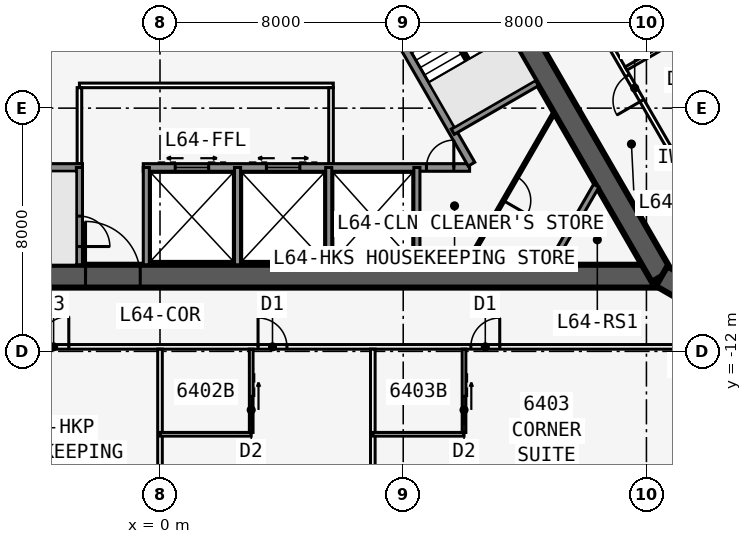
"""IFC4 building model, lengths in metres.
Left out: names, types, materials, properties, quantities, classifications, styles, units other than length and angle.
Written with IfcOpenShell. Run it as: python <this file> out.ifc"""

import sys

from ifc_helpers import new_model, si_unit, direction, frame, frame_2d, origin, place, context, subcontext, project, spatial, rectangle, extrude, element, fill, save


model = new_model("IFC4")
c1 = context("Model", 3, precision=1e-05, world=origin(), true_north=direction((0.0, 1.0)))
c2 = subcontext(c1, "Body", "Model", "MODEL_VIEW")
j1 = project(units=[si_unit("LENGTHUNIT", "METRE"), si_unit("PLANEANGLEUNIT", "RADIAN")], contexts=[c1])
p1 = place(None, origin())
s1 = spatial("IfcSite", under=j1, at=p1, CompositionType="ELEMENT")
p2 = place(p1, origin())
s2 = spatial("IfcBuilding", under=s1, at=p2, CompositionType="ELEMENT")
p3 = place(p2, frame((0.0, 0.0, 242.9)))
s3 = spatial("IfcBuildingStorey", under=s2, at=p3, CompositionType="ELEMENT", Elevation=242.9)
p4 = place(p3, frame((-16.5, -9.526, 0.0), z_axis=(0.0, 0.0, 1.0), x_axis=(1.0, 0.0, 0.0)))
e1 = element("IfcWall", 1, at=p4, inside=s3, PredefinedType="SHEAR", context=c2, shape_type="SweptSolid", body=[
    extrude(rectangle(XDim=33.0, YDim=0.75, at=frame_2d((16.5, 0.0))), origin(), (0.0, 0.0, 1.0), 3.6),
])
p5 = place(p4, frame((14.05, 0.0, 0.0)))
e2 = element("IfcOpeningElement", 2, at=p5, cuts=e1, PredefinedType="OPENING", context=c2, shape_type="SweptSolid", body=[
    extrude(rectangle(XDim=1.8, YDim=2.13, at=frame_2d((0.9, 1.065))), frame((0.0, 0.385, 0.0), z_axis=(0.0, -1.0, 0.0), x_axis=(1.0, 0.0, 0.0)), (0.0, 0.0, 1.0), 0.77),
])
p6 = place(p3, frame((-10.183, -5.951, 0.0), z_axis=(0.0, 0.0, 1.0), x_axis=(1.0, 0.0, 0.0)))
e3 = element("IfcWall", 3, at=p6, inside=s3, PredefinedType="SOLIDWALL", context=c2, shape_type="SweptSolid", body=[
    extrude(rectangle(XDim=7.633, YDim=0.25, at=frame_2d((3.816, 0.0))), origin(), (0.0, 0.0, 1.0), 3.435),
])
p7 = place(p3, frame((-0.55, -5.951, 0.0), z_axis=(0.0, 0.0, 1.0), x_axis=(1.0, 0.0, 0.0)))
e4 = element("IfcWall", 4, at=p7, inside=s3, PredefinedType="SOLIDWALL", context=c2, shape_type="SweptSolid", body=[
    extrude(rectangle(XDim=10.733, YDim=0.25, at=frame_2d((5.366, 0.0))), origin(), (0.0, 0.0, 1.0), 3.435),
])
p8 = place(p7, frame((9.314, 0.0, 0.0)))
e5 = element("IfcOpeningElement", 5, at=p8, cuts=e4, PredefinedType="OPENING", context=c2, shape_type="SweptSolid", body=[
    extrude(rectangle(XDim=0.9, YDim=2.13, at=frame_2d((0.45, 1.065))), frame((0.0, 0.135, 0.0), z_axis=(0.0, -1.0, 0.0), x_axis=(1.0, 0.0, 0.0)), (0.0, 0.0, 1.0), 0.27),
])
p9 = place(p7, frame((1.05, 0.0, 0.0)))
e6 = element("IfcOpeningElement", 6, at=p9, cuts=e4, PredefinedType="OPENING", context=c2, shape_type="SweptSolid", body=[
    extrude(rectangle(XDim=1.1, YDim=2.13, at=frame_2d((0.55, 1.065))), frame((0.0, 0.135, 0.0), z_axis=(0.0, -1.0, 0.0), x_axis=(1.0, 0.0, 0.0)), (0.0, 0.0, 1.0), 0.27),
])
p10 = place(p7, frame((4.05, 0.0, 0.0)))
e7 = element("IfcOpeningElement", 7, at=p10, cuts=e4, PredefinedType="OPENING", context=c2, shape_type="SweptSolid", body=[
    extrude(rectangle(XDim=1.1, YDim=2.13, at=frame_2d((0.55, 1.065))), frame((0.0, 0.135, 0.0), z_axis=(0.0, -1.0, 0.0), x_axis=(1.0, 0.0, 0.0)), (0.0, 0.0, 1.0), 0.27),
])
p11 = place(p3, frame((-2.65, -5.951, 0.0), z_axis=(0.0, 0.0, 1.0), x_axis=(0.0, -1.0, 0.0)))
e8 = element("IfcWall", 8, at=p11, inside=s3, PredefinedType="SOLIDWALL", context=c2, shape_type="SweptSolid", body=[
    extrude(rectangle(XDim=3.2, YDim=0.2, at=frame_2d((1.6, 0.0))), origin(), (0.0, 0.0, 1.0), 3.435),
])
p12 = place(p11, frame((1.6, 0.0, 0.0)))
e9 = element("IfcOpeningElement", 9, at=p12, cuts=e8, PredefinedType="OPENING", context=c2, shape_type="SweptSolid", body=[
    extrude(rectangle(XDim=1.0, YDim=2.13, at=frame_2d((0.5, 1.065))), frame((0.0, 0.11, 0.0), z_axis=(0.0, -1.0, 0.0), x_axis=(1.0, 0.0, 0.0)), (0.0, 0.0, 1.0), 0.22),
])
for number, where, z_axis, x_axis in (
    (10, (-0.45, -5.951, 0.0), (0.0, 0.0, 1.0), (0.0, -1.0, 0.0)),
    (11, (2.55, -5.951, 0.0), (0.0, 0.0, 1.0), (0.0, -1.0, 0.0)),
    (12, (5.55, -5.951, 0.0), (0.0, 0.0, 1.0), (0.0, -1.0, 0.0)),
    (13, (8.45, -5.951, 0.0), (0.0, 0.0, 1.0), (0.0, -1.0, 0.0)),
):
    element("IfcWall", number, at=place(p3, frame(where, z_axis=z_axis, x_axis=x_axis)), inside=s3, PredefinedType="SOLIDWALL", context=c2, shape_type="SweptSolid", body=[
        extrude(rectangle(XDim=3.2, YDim=0.2, at=frame_2d((1.6, 0.0))), origin(), (0.0, 0.0, 1.0), 3.435),
    ])
p13 = place(p3, frame((16.5, -9.526, 0.0), z_axis=(0.0, 0.0, 1.0), x_axis=(-0.499999749417, 0.866025548458, 0.0)))
e14 = element("IfcWall", 14, at=p13, inside=s3, PredefinedType="SHEAR", context=c2, shape_type="SweptSolid", body=[
    extrude(rectangle(XDim=33.0, YDim=0.75, at=frame_2d((16.5, 0.0))), origin(), (0.0, 0.0, 1.0), 3.6),
])
p14 = place(p13, frame((14.15, 0.0, 0.0)))
e15 = element("IfcOpeningElement", 15, at=p14, cuts=e14, PredefinedType="OPENING", context=c2, shape_type="SweptSolid", body=[
    extrude(rectangle(XDim=1.8, YDim=2.13, at=frame_2d((0.9, 1.065))), frame((0.0, 0.385, 0.0), z_axis=(0.0, -1.0, 0.0), x_axis=(1.0, 0.0, 0.0)), (0.0, 0.0, 1.0), 0.77),
])
p15 = place(p13, frame((12.6, 0.0, 0.0)))
e16 = element("IfcOpeningElement", 16, at=p15, cuts=e14, PredefinedType="OPENING", context=c2, shape_type="SweptSolid", body=[
    extrude(rectangle(XDim=1.0, YDim=2.13, at=frame_2d((0.5, 1.065))), frame((0.0, 0.385, 0.0), z_axis=(0.0, -1.0, 0.0), x_axis=(1.0, 0.0, 0.0)), (0.0, 0.0, 1.0), 0.77),
])
p16 = place(p3, frame((10.245, -5.843, 0.0), z_axis=(0.0, 0.0, 1.0), x_axis=(-0.499993009313, 0.866029439822, 0.0)))
e17 = element("IfcWall", 17, at=p16, inside=s3, PredefinedType="SOLIDWALL", context=c2, shape_type="SweptSolid", body=[
    extrude(rectangle(XDim=7.733, YDim=0.25, at=frame_2d((3.866, 0.0))), origin(), (0.0, 0.0, 1.0), 3.435),
])
p17 = place(p3, frame((9.629, -4.775, 0.0), z_axis=(0.0, 0.0, 1.0), x_axis=(0.866008981251, 0.500028443584, 0.0)))
e18 = element("IfcWall", 18, at=p17, inside=s3, PredefinedType="SOLIDWALL", context=c2, shape_type="SweptSolid", body=[
    extrude(rectangle(XDim=3.2, YDim=0.2, at=frame_2d((1.6, 0.0))), origin(), (0.0, 0.0, 1.0), 3.435),
])
p18 = place(p3, frame((0.0, 19.052, 0.0), z_axis=(0.0, 0.0, 1.0), x_axis=(-0.499999749417, -0.866025548458, 0.0)))
e19 = element("IfcWall", 19, at=p18, inside=s3, PredefinedType="SHEAR", context=c2, shape_type="SweptSolid", body=[
    extrude(rectangle(XDim=33.0, YDim=0.75, at=frame_2d((16.5, 0.0))), origin(), (0.0, 0.0, 1.0), 3.6),
])
p19 = place(p18, frame((14.15, 0.0, 0.0)))
e20 = element("IfcOpeningElement", 20, at=p19, cuts=e19, PredefinedType="OPENING", context=c2, shape_type="SweptSolid", body=[
    extrude(rectangle(XDim=1.8, YDim=2.13, at=frame_2d((0.9, 1.065))), frame((0.0, 0.385, 0.0), z_axis=(0.0, -1.0, 0.0), x_axis=(1.0, 0.0, 0.0)), (0.0, 0.0, 1.0), 0.77),
])
p20 = place(p18, frame((12.6, 0.0, 0.0)))
e21 = element("IfcOpeningElement", 21, at=p20, cuts=e19, PredefinedType="OPENING", context=c2, shape_type="SweptSolid", body=[
    extrude(rectangle(XDim=1.0, YDim=2.13, at=frame_2d((0.5, 1.065))), frame((0.0, 0.385, 0.0), z_axis=(0.0, -1.0, 0.0), x_axis=(1.0, 0.0, 0.0)), (0.0, 0.0, 1.0), 0.77),
])
p21 = place(p3, frame((16.5, -9.526, 0.0), z_axis=(0.0, 0.0, 1.0), x_axis=(0.866031398331, -0.499989616998, 0.0)))
e22 = element("IfcWall", 22, at=p21, inside=s3, PredefinedType="SHEAR", context=c2, shape_type="SweptSolid", body=[
    extrude(rectangle(XDim=4.746, YDim=0.75, at=frame_2d((2.373, 0.0))), origin(), (0.0, 0.0, 1.0), 3.6),
])
p22 = place(p21, frame((1.725, 0.0, 0.0)))
e23 = element("IfcOpeningElement", 23, at=p22, cuts=e22, PredefinedType="OPENING", context=c2, shape_type="SweptSolid", body=[
    extrude(rectangle(XDim=1.8, YDim=2.13, at=frame_2d((0.9, 1.065))), frame((0.0, 0.385, 0.0), z_axis=(0.0, -1.0, 0.0), x_axis=(1.0, 0.0, 0.0)), (0.0, 0.0, 1.0), 0.77),
])
p23 = place(p3, frame((13.942, -17.103, 0.0), z_axis=(0.0, 0.0, 1.0), x_axis=(0.965913862671, 0.258863689806, 0.0)))
e24 = element("IfcWall", 24, at=p23, inside=s3, PredefinedType="SOLIDWALL", context=c2, shape_type="SweptSolid", body=[
    extrude(rectangle(XDim=4.782, YDim=0.45, at=frame_2d((2.391, 0.0))), origin(), (0.0, 0.0, 1.0), 3.435),
])
p24 = place(p23, frame((0.591, 0.0, 0.45)))
e25 = element("IfcOpeningElement", 25, at=p24, cuts=e24, PredefinedType="OPENING", context=c2, shape_type="SweptSolid", body=[
    extrude(rectangle(XDim=3.6, YDim=2.6, at=frame_2d((1.8, 1.3))), frame((0.0, 0.235, 0.0), z_axis=(0.0, -1.0, 0.0), x_axis=(1.0, 0.0, 0.0)), (0.0, 0.0, 1.0), 0.47),
])
p25 = place(p3, frame((-19.677, -11.851, 0.0), z_axis=(0.0, 0.0, 1.0), x_axis=(1.0, 0.0, 0.0)))
e26 = element("IfcWall", 26, at=p25, inside=s3, PredefinedType="PARTITIONING", context=c2, shape_type="SweptSolid", body=[
    extrude(rectangle(XDim=39.354, YDim=0.15, at=frame_2d((19.677, 0.0))), origin(), (0.0, 0.0, 1.0), 3.435),
])
p26 = place(p25, frame((8.502, 0.0, 0.0)))
e27 = element("IfcOpeningElement", 27, at=p26, cuts=e26, PredefinedType="OPENING", context=c2, shape_type="SweptSolid", body=[
    extrude(rectangle(XDim=0.95, YDim=2.13, at=frame_2d((0.475, 1.065))), frame((0.0, 0.085, 0.0), z_axis=(0.0, -1.0, 0.0), x_axis=(1.0, 0.0, 0.0)), (0.0, 0.0, 1.0), 0.17),
])
p27 = place(p25, frame((15.677, 0.0, 0.0)))
e28 = element("IfcOpeningElement", 28, at=p27, cuts=e26, PredefinedType="OPENING", context=c2, shape_type="SweptSolid", body=[
    extrude(rectangle(XDim=1.0, YDim=2.13, at=frame_2d((0.5, 1.065))), frame((0.0, 0.085, 0.0), z_axis=(0.0, -1.0, 0.0), x_axis=(1.0, 0.0, 0.0)), (0.0, 0.0, 1.0), 0.17),
])
p28 = place(p25, frame((22.902, 0.0, 0.0)))
e29 = element("IfcOpeningElement", 29, at=p28, cuts=e26, PredefinedType="OPENING", context=c2, shape_type="SweptSolid", body=[
    extrude(rectangle(XDim=0.95, YDim=2.13, at=frame_2d((0.475, 1.065))), frame((0.0, 0.085, 0.0), z_axis=(0.0, -1.0, 0.0), x_axis=(1.0, 0.0, 0.0)), (0.0, 0.0, 1.0), 0.17),
])
p29 = place(p25, frame((29.902, 0.0, 0.0)))
e30 = element("IfcOpeningElement", 30, at=p29, cuts=e26, PredefinedType="OPENING", context=c2, shape_type="SweptSolid", body=[
    extrude(rectangle(XDim=0.95, YDim=2.13, at=frame_2d((0.475, 1.065))), frame((0.0, 0.085, 0.0), z_axis=(0.0, -1.0, 0.0), x_axis=(1.0, 0.0, 0.0)), (0.0, 0.0, 1.0), 0.17),
])
p30 = place(p3, frame((0.0, -11.926, 0.0), z_axis=(0.0, 0.0, 1.0), x_axis=(0.0, -1.0, 0.0)))
e31 = element("IfcWall", 31, at=p30, inside=s3, PredefinedType="PARTITIONING", context=c2, shape_type="SweptSolid", body=[
    extrude(rectangle(XDim=6.854, YDim=0.15, at=frame_2d((3.427, 0.0))), origin(), (0.0, 0.0, 1.0), 2.678),
])
p31 = place(p3, frame((7.0, -11.926, 0.0), z_axis=(0.0, 0.0, 1.0), x_axis=(0.0, -1.0, 0.0)))
e32 = element("IfcWall", 32, at=p31, inside=s3, PredefinedType="PARTITIONING", context=c2, shape_type="SweptSolid", body=[
    extrude(rectangle(XDim=6.609, YDim=0.15, at=frame_2d((3.304, 0.0))), origin(), (0.0, 0.0, 1.0), 2.678),
])
p32 = place(p3, frame((0.0, -14.726, 0.0), z_axis=(0.0, 0.0, 1.0), x_axis=(1.0, 0.0, 0.0)))
e33 = element("IfcWall", 33, at=p32, inside=s3, PredefinedType="PLUMBINGWALL", context=c2, shape_type="SweptSolid", body=[
    extrude(rectangle(XDim=3.0, YDim=0.12, at=frame_2d((1.5, 0.0))), origin(), (0.0, 0.0, 1.0), 3.435),
])
p33 = place(p3, frame((3.0, -11.926, 0.0), z_axis=(0.0, 0.0, 1.0), x_axis=(0.0, -1.0, 0.0)))
e34 = element("IfcWall", 34, at=p33, inside=s3, PredefinedType="PLUMBINGWALL", context=c2, shape_type="SweptSolid", body=[
    extrude(rectangle(XDim=2.74, YDim=0.12, at=frame_2d((1.37, 0.0))), origin(), (0.0, 0.0, 1.0), 3.435),
])
p34 = place(p33, frame((1.55, 0.0, 0.0)))
e35 = element("IfcOpeningElement", 35, at=p34, cuts=e34, PredefinedType="OPENING", context=c2, shape_type="SweptSolid", body=[
    extrude(rectangle(XDim=0.9, YDim=2.13, at=frame_2d((0.45, 1.065))), frame((0.0, 0.07, 0.0), z_axis=(0.0, -1.0, 0.0), x_axis=(1.0, 0.0, 0.0)), (0.0, 0.0, 1.0), 0.14),
])
p35 = place(p3, frame((7.0, -14.726, 0.0), z_axis=(0.0, 0.0, 1.0), x_axis=(1.0, 0.0, 0.0)))
e36 = element("IfcWall", 36, at=p35, inside=s3, PredefinedType="PLUMBINGWALL", context=c2, shape_type="SweptSolid", body=[
    extrude(rectangle(XDim=3.0, YDim=0.12, at=frame_2d((1.5, 0.0))), origin(), (0.0, 0.0, 1.0), 3.435),
])
p36 = place(p3, frame((10.0, -11.926, 0.0), z_axis=(0.0, 0.0, 1.0), x_axis=(0.0, -1.0, 0.0)))
e37 = element("IfcWall", 37, at=p36, inside=s3, PredefinedType="PLUMBINGWALL", context=c2, shape_type="SweptSolid", body=[
    extrude(rectangle(XDim=2.74, YDim=0.12, at=frame_2d((1.37, 0.0))), origin(), (0.0, 0.0, 1.0), 3.435),
])
p37 = place(p36, frame((1.55, 0.0, 0.0)))
e38 = element("IfcOpeningElement", 38, at=p37, cuts=e37, PredefinedType="OPENING", context=c2, shape_type="SweptSolid", body=[
    extrude(rectangle(XDim=0.9, YDim=2.13, at=frame_2d((0.45, 1.065))), frame((0.0, 0.07, 0.0), z_axis=(0.0, -1.0, 0.0), x_axis=(1.0, 0.0, 0.0)), (0.0, 0.0, 1.0), 0.14),
])
p38 = place(p3, frame((20.102, -11.115, 0.0), z_axis=(0.0, 0.0, 1.0), x_axis=(-0.500001960654, 0.866024271797, 0.0)))
e39 = element("IfcWall", 39, at=p38, inside=s3, PredefinedType="PARTITIONING", context=c2, shape_type="SweptSolid", body=[
    extrude(rectangle(XDim=12.677, YDim=0.15, at=frame_2d((6.339, 0.0))), origin(), (0.0, 0.0, 1.0), 3.435),
])
p39 = place(p38, frame((8.502, 0.0, 0.0)))
e40 = element("IfcOpeningElement", 40, at=p39, cuts=e39, PredefinedType="OPENING", context=c2, shape_type="SweptSolid", body=[
    extrude(rectangle(XDim=0.95, YDim=2.13, at=frame_2d((0.475, 1.065))), frame((0.0, 0.085, 0.0), z_axis=(0.0, -1.0, 0.0), x_axis=(1.0, 0.0, 0.0)), (0.0, 0.0, 1.0), 0.17),
])
p40 = place(p3, frame((15.329, -2.697, 0.0), z_axis=(0.0, 0.0, 1.0), x_axis=(0.866035715982, 0.499982138324, 0.0)))
e41 = element("IfcWall", 41, at=p40, inside=s3, PredefinedType="PLUMBINGWALL", context=c2, shape_type="SweptSolid", body=[
    extrude(rectangle(XDim=2.74, YDim=0.12, at=frame_2d((1.37, 0.0))), origin(), (0.0, 0.0, 1.0), 3.435),
])
p41 = place(p40, frame((1.55, 0.0, 0.0)))
e42 = element("IfcOpeningElement", 42, at=p41, cuts=e41, PredefinedType="OPENING", context=c2, shape_type="SweptSolid", body=[
    extrude(rectangle(XDim=0.9, YDim=2.13, at=frame_2d((0.45, 1.065))), frame((0.0, 0.07, 0.0), z_axis=(0.0, -1.0, 0.0), x_axis=(1.0, 0.0, 0.0)), (0.0, 0.0, 1.0), 0.14),
])
p42 = place(p3, frame((-0.425, 22.966, 0.0), z_axis=(0.0, 0.0, 1.0), x_axis=(-0.500000265775, -0.866025250339, 0.0)))
e43 = element("IfcWall", 43, at=p42, inside=s3, PredefinedType="PARTITIONING", context=c2, shape_type="SweptSolid", body=[
    extrude(rectangle(XDim=39.354, YDim=0.15, at=frame_2d((19.677, 0.0))), origin(), (0.0, 0.0, 1.0), 3.435),
])
p43 = place(p42, frame((8.502, 0.0, 0.0)))
e44 = element("IfcOpeningElement", 44, at=p43, cuts=e43, PredefinedType="OPENING", context=c2, shape_type="SweptSolid", body=[
    extrude(rectangle(XDim=0.95, YDim=2.13, at=frame_2d((0.475, 1.065))), frame((0.0, 0.085, 0.0), z_axis=(0.0, -1.0, 0.0), x_axis=(1.0, 0.0, 0.0)), (0.0, 0.0, 1.0), 0.17),
])
p44 = place(p42, frame((15.902, 0.0, 0.0)))
e45 = element("IfcOpeningElement", 45, at=p44, cuts=e43, PredefinedType="OPENING", context=c2, shape_type="SweptSolid", body=[
    extrude(rectangle(XDim=0.95, YDim=2.13, at=frame_2d((0.475, 1.065))), frame((0.0, 0.085, 0.0), z_axis=(0.0, -1.0, 0.0), x_axis=(1.0, 0.0, 0.0)), (0.0, 0.0, 1.0), 0.17),
])
p45 = place(p42, frame((22.902, 0.0, 0.0)))
e46 = element("IfcOpeningElement", 46, at=p45, cuts=e43, PredefinedType="OPENING", context=c2, shape_type="SweptSolid", body=[
    extrude(rectangle(XDim=0.95, YDim=2.13, at=frame_2d((0.475, 1.065))), frame((0.0, 0.085, 0.0), z_axis=(0.0, -1.0, 0.0), x_axis=(1.0, 0.0, 0.0)), (0.0, 0.0, 1.0), 0.17),
])
p46 = place(p42, frame((29.902, 0.0, 0.0)))
e47 = element("IfcOpeningElement", 47, at=p46, cuts=e43, PredefinedType="OPENING", context=c2, shape_type="SweptSolid", body=[
    extrude(rectangle(XDim=0.95, YDim=2.13, at=frame_2d((0.475, 1.065))), frame((0.0, 0.085, 0.0), z_axis=(0.0, -1.0, 0.0), x_axis=(1.0, 0.0, 0.0)), (0.0, 0.0, 1.0), 0.17),
])
p47 = place(p3, frame((-2.65, -3.251, 0.0), z_axis=(0.0, 0.0, 1.0), x_axis=(1.0, 0.0, 0.0)))
e48 = element("IfcWall", 48, at=p47, inside=s3, PredefinedType="PARTITIONING", context=c2, shape_type="SweptSolid", body=[
    extrude(rectangle(XDim=8.35, YDim=0.15, at=frame_2d((4.175, 0.0))), origin(), (0.0, 0.0, 1.0), 3.435),
])
for number, where, z_axis, x_axis in (
    (49, (-2.65, -5.826, 0.0), (0.0, 0.0, 1.0), (0.0, 1.0, 0.0)),
    (50, (5.625, -5.826, 0.0), (0.0, 0.0, 1.0), (0.0, 1.0, 0.0)),
):
    element("IfcWall", number, at=place(p3, frame(where, z_axis=z_axis, x_axis=x_axis)), inside=s3, PredefinedType="PARTITIONING", context=c2, shape_type="SweptSolid", body=[
        extrude(rectangle(XDim=2.5, YDim=0.15, at=frame_2d((1.25, 0.0))), origin(), (0.0, 0.0, 1.0), 3.435),
    ])
p48 = place(p3, frame((14.349, -6.551, 0.0), z_axis=(0.0, 0.0, 1.0), x_axis=(-0.499952404951, -0.866052881055, 0.0)))
e51 = element("IfcWall", 51, at=p48, inside=s3, PredefinedType="SOLIDWALL", context=c2, shape_type="SweptSolid", body=[
    extrude(rectangle(XDim=3.002, YDim=0.2, at=frame_2d((1.501, 0.0))), origin(), (0.0, 0.0, 1.0), 3.435),
])
p49 = place(p3, frame((12.964, -4.151, 0.0), z_axis=(0.0, 0.0, 1.0), x_axis=(-0.500027479704, -0.866009537788, 0.0)))
e52 = element("IfcWall", 52, at=p49, inside=s3, PredefinedType="PARTITIONING", context=c2, shape_type="SweptSolid", body=[
    extrude(rectangle(XDim=5.774, YDim=0.1, at=frame_2d((2.887, 0.0))), origin(), (0.0, 0.0, 1.0), 3.435),
])
p50 = place(p49, frame((2.437, 0.0, 0.0)))
e53 = element("IfcOpeningElement", 53, at=p50, cuts=e52, PredefinedType="OPENING", context=c2, shape_type="SweptSolid", body=[
    extrude(rectangle(XDim=0.9, YDim=2.13, at=frame_2d((0.45, 1.065))), frame((0.0, 0.06, 0.0), z_axis=(0.0, -1.0, 0.0), x_axis=(1.0, 0.0, 0.0)), (0.0, 0.0, 1.0), 0.12),
])
p51 = place(p3, frame((10.135, -2.401, 0.0), z_axis=(0.0, 0.0, 1.0), x_axis=(-0.499992232847, 0.866029888106, 0.0)))
e54 = element("IfcWall", 54, at=p51, inside=s3, PredefinedType="SOLIDWALL", context=c2, shape_type="SweptSolid", body=[
    extrude(rectangle(XDim=2.794, YDim=0.1, at=frame_2d((1.397, 0.0))), origin(), (0.0, 0.0, 1.0), 3.6),
])
p52 = place(p27, origin())
e55 = element("IfcDoor", 55, at=p52, inside=s3, OperationType="SINGLE_SWING_RIGHT", PredefinedType="DOOR", context=c2, shape_type="SweptSolid", body=[
    extrude(rectangle(XDim=1.0, YDim=2.13, at=frame_2d((0.5, 1.065))), frame((0.0, 0.025, 0.0), z_axis=(0.0, -1.0, 0.0), x_axis=(1.0, 0.0, 0.0)), (0.0, 0.0, 1.0), 0.05),
])
fill(e28, e55)
p53 = place(p34, origin())
e56 = element("IfcDoor", 56, at=p53, inside=s3, OperationType="SLIDING_TO_LEFT", PredefinedType="DOOR", context=c2, shape_type="SweptSolid", body=[
    extrude(rectangle(XDim=0.9, YDim=2.13, at=frame_2d((0.45, 1.065))), frame((0.0, 0.025, 0.0), z_axis=(0.0, -1.0, 0.0), x_axis=(1.0, 0.0, 0.0)), (0.0, 0.0, 1.0), 0.05),
])
fill(e35, e56)
p54 = place(p28, origin())
e57 = element("IfcDoor", 57, at=p54, inside=s3, OperationType="SINGLE_SWING_LEFT", PredefinedType="DOOR", context=c2, shape_type="SweptSolid", body=[
    extrude(rectangle(XDim=0.95, YDim=2.13, at=frame_2d((0.475, 1.065))), frame((0.0, 0.025, 0.0), z_axis=(0.0, -1.0, 0.0), x_axis=(1.0, 0.0, 0.0)), (0.0, 0.0, 1.0), 0.05),
])
fill(e29, e57)
p55 = place(p37, origin())
e58 = element("IfcDoor", 58, at=p55, inside=s3, OperationType="SLIDING_TO_LEFT", PredefinedType="DOOR", context=c2, shape_type="SweptSolid", body=[
    extrude(rectangle(XDim=0.9, YDim=2.13, at=frame_2d((0.45, 1.065))), frame((0.0, 0.025, 0.0), z_axis=(0.0, -1.0, 0.0), x_axis=(1.0, 0.0, 0.0)), (0.0, 0.0, 1.0), 0.05),
])
fill(e38, e58)
p56 = place(p29, origin())
e59 = element("IfcDoor", 59, at=p56, inside=s3, OperationType="SINGLE_SWING_RIGHT", PredefinedType="DOOR", context=c2, shape_type="SweptSolid", body=[
    extrude(rectangle(XDim=0.95, YDim=2.13, at=frame_2d((0.475, 1.065))), frame((0.0, 0.025, 0.0), z_axis=(0.0, -1.0, 0.0), x_axis=(1.0, 0.0, 0.0)), (0.0, 0.0, 1.0), 0.05),
])
fill(e30, e59)
p57 = place(p39, origin())
e60 = element("IfcDoor", 60, at=p57, inside=s3, OperationType="SINGLE_SWING_LEFT", PredefinedType="DOOR", context=c2, shape_type="SweptSolid", body=[
    extrude(rectangle(XDim=0.95, YDim=2.13, at=frame_2d((0.475, 1.065))), frame((0.0, 0.025, 0.0), z_axis=(0.0, -1.0, 0.0), x_axis=(1.0, 0.0, 0.0)), (0.0, 0.0, 1.0), 0.05),
])
fill(e40, e60)
p58 = place(p5, origin())
e61 = element("IfcDoor", 61, at=p58, inside=s3, OperationType="DOUBLE_DOOR_SINGLE_SWING", PredefinedType="DOOR", context=c2, shape_type="SweptSolid", body=[
    extrude(rectangle(XDim=1.8, YDim=2.13, at=frame_2d((0.9, 1.065))), frame((0.0, 0.025, 0.0), z_axis=(0.0, -1.0, 0.0), x_axis=(1.0, 0.0, 0.0)), (0.0, 0.0, 1.0), 0.05),
])
fill(e2, e61)
p59 = place(p12, origin())
e62 = element("IfcDoor", 62, at=p59, inside=s3, OperationType="SINGLE_SWING_RIGHT", PredefinedType="DOOR", context=c2, shape_type="SweptSolid", body=[
    extrude(rectangle(XDim=1.0, YDim=2.13, at=frame_2d((0.5, 1.065))), frame((0.0, 0.025, 0.0), z_axis=(0.0, -1.0, 0.0), x_axis=(1.0, 0.0, 0.0)), (0.0, 0.0, 1.0), 0.05),
])
fill(e9, e62)
p60 = place(p50, origin())
e63 = element("IfcDoor", 63, at=p60, inside=s3, OperationType="SINGLE_SWING_RIGHT", PredefinedType="DOOR", context=c2, shape_type="SweptSolid", body=[
    extrude(rectangle(XDim=0.9, YDim=2.13, at=frame_2d((0.45, 1.065))), frame((0.0, 0.025, 0.0), z_axis=(0.0, -1.0, 0.0), x_axis=(1.0, 0.0, 0.0)), (0.0, 0.0, 1.0), 0.05),
])
fill(e53, e63)
p61 = place(p8, origin())
e64 = element("IfcDoor", 64, at=p61, inside=s3, OperationType="SINGLE_SWING_RIGHT", PredefinedType="DOOR", context=c2, shape_type="SweptSolid", body=[
    extrude(rectangle(XDim=0.9, YDim=2.13, at=frame_2d((0.45, 1.065))), frame((0.0, 0.025, 0.0), z_axis=(0.0, -1.0, 0.0), x_axis=(1.0, 0.0, 0.0)), (0.0, 0.0, 1.0), 0.05),
])
fill(e5, e64)
p62 = place(p9, origin())
e65 = element("IfcDoor", 65, at=p62, inside=s3, OperationType="DOUBLE_DOOR_SLIDING", PredefinedType="USERDEFINED", context=c2, shape_type="SweptSolid", body=[
    extrude(rectangle(XDim=1.1, YDim=2.13, at=frame_2d((0.55, 1.065))), frame((0.0, 0.025, 0.0), z_axis=(0.0, -1.0, 0.0), x_axis=(1.0, 0.0, 0.0)), (0.0, 0.0, 1.0), 0.05),
])
fill(e6, e65)
p63 = place(p10, origin())
e66 = element("IfcDoor", 66, at=p63, inside=s3, OperationType="DOUBLE_DOOR_SLIDING", PredefinedType="USERDEFINED", context=c2, shape_type="SweptSolid", body=[
    extrude(rectangle(XDim=1.1, YDim=2.13, at=frame_2d((0.55, 1.065))), frame((0.0, 0.025, 0.0), z_axis=(0.0, -1.0, 0.0), x_axis=(1.0, 0.0, 0.0)), (0.0, 0.0, 1.0), 0.05),
])
fill(e7, e66)
save(model, sys.argv[1])
